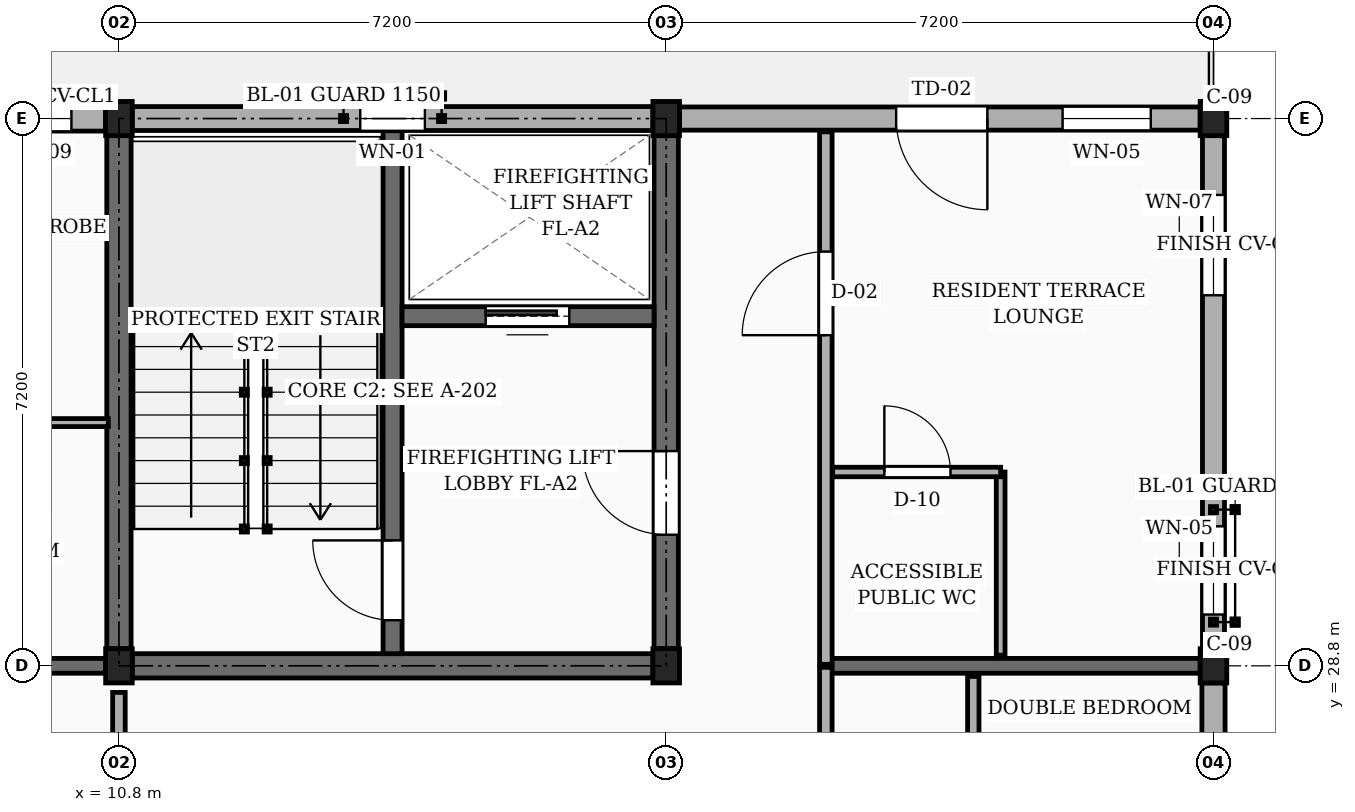
"""IFC4 building model, lengths in metres.
Left out: names, types, materials, properties, quantities, classifications, styles, units other than length and angle.
Written with IfcOpenShell. Run it as: python <this file> out.ifc"""

import sys

from ifc_helpers import new_model, si_unit, direction, frame, frame_2d, origin, origin_2d, place, context, subcontext, project, spatial, rectangle, extrude, element, fill, save


model = new_model("IFC4")
c1 = context("Model", 3, precision=1e-05, world=origin(), true_north=direction((0.0, 1.0)))
c2 = subcontext(c1, "Body", "Model", "MODEL_VIEW")
j1 = project(units=[si_unit("LENGTHUNIT", "METRE"), si_unit("PLANEANGLEUNIT", "RADIAN")], contexts=[c1])
p1 = place(None, origin())
s1 = spatial("IfcSite", under=j1, at=p1, CompositionType="ELEMENT")
p2 = place(p1, origin())
s2 = spatial("IfcBuilding", under=s1, at=p2, CompositionType="ELEMENT")
p3 = place(p2, frame((0.0, 0.0, 45.45)))
s3 = spatial("IfcBuildingStorey", under=s2, at=p3, CompositionType="ELEMENT", Elevation=45.45)
for number, where, z_axis, x_axis in (
    (1, (10.8, 28.8, 0.0), (0.0, 0.0, 1.0), (1.0, 0.0, 0.0)),
    (2, (10.8, 36.0, 0.0), (0.0, 0.0, 1.0), (1.0, 0.0, 0.0)),
    (3, (18.0, 28.8, 0.0), (0.0, 0.0, 1.0), (1.0, 0.0, 0.0)),
    (4, (18.0, 36.0, 0.0), (0.0, 0.0, 1.0), (1.0, 0.0, 0.0)),
    (5, (25.2, 28.8, 0.0), (0.0, 0.0, 1.0), (1.0, 0.0, 0.0)),
    (6, (25.2, 36.0, 0.0), (0.0, 0.0, 1.0), (1.0, 0.0, 0.0)),
):
    element("IfcColumn", number, at=place(p3, frame(where, z_axis=z_axis, x_axis=x_axis)), inside=s3, PredefinedType="COLUMN", context=c2, shape_type="SweptSolid", body=[
        extrude(rectangle(XDim=0.35, YDim=0.45, at=origin_2d()), origin(), (0.0, 0.0, 1.0), 3.15),
    ])
p4 = place(p3, frame((3.775, 28.8, 0.0), z_axis=(0.0, 0.0, 1.0), x_axis=(1.0, 0.0, 0.0)))
e7 = element("IfcWall", 7, at=p4, inside=s3, PredefinedType="SOLIDWALL", context=c2, shape_type="SweptSolid", body=[
    extrude(rectangle(XDim=6.85, YDim=0.195, at=frame_2d((3.425, 0.0))), origin(), (0.0, 0.0, 1.0), 2.17),
])
p5 = place(p4, frame((1.35, 0.0, 0.0)))
e8 = element("IfcOpeningElement", 8, at=p5, cuts=e7, PredefinedType="OPENING", context=c2, shape_type="SweptSolid", body=[
    extrude(rectangle(XDim=0.98, YDim=2.12, at=frame_2d((0.49, 1.06))), frame((0.0, 0.107, 0.0), z_axis=(0.0, -1.0, 0.0), x_axis=(1.0, 0.0, 0.0)), (0.0, 0.0, 1.0), 0.215),
])
p6 = place(p3, frame((20.1, 28.8, 0.0), z_axis=(0.0, 0.0, 1.0), x_axis=(1.0, 0.0, 0.0)))
e9 = element("IfcWall", 9, at=p6, inside=s3, PredefinedType="SOLIDWALL", context=c2, shape_type="SweptSolid", body=[
    extrude(rectangle(XDim=4.925, YDim=0.195, at=frame_2d((2.462, 0.0))), origin(), (0.0, 0.0, 1.0), 2.17),
])
p7 = place(p3, frame((25.2, 21.825, 0.0), z_axis=(0.0, 0.0, 1.0), x_axis=(0.0, 1.0, 0.0)))
e10 = element("IfcWall", 10, at=p7, inside=s3, PredefinedType="SOLIDWALL", context=c2, shape_type="SweptSolid", body=[
    extrude(rectangle(XDim=6.75, YDim=0.305, at=frame_2d((3.375, 0.0))), origin(), (0.0, 0.0, 1.0), 2.44),
])
p8 = place(p7, frame((0.45, 0.0, 0.78)))
e11 = element("IfcOpeningElement", 11, at=p8, cuts=e10, PredefinedType="OPENING", context=c2, shape_type="SweptSolid", body=[
    extrude(rectangle(XDim=1.0, YDim=1.15, at=frame_2d((0.5, 0.575))), frame((0.0, 0.163, 0.0), z_axis=(0.0, -1.0, 0.0), x_axis=(1.0, 0.0, 0.0)), (0.0, 0.0, 1.0), 0.325),
])
p9 = place(p7, frame((4.65, 0.0, 0.78)))
e12 = element("IfcOpeningElement", 12, at=p9, cuts=e10, PredefinedType="OPENING", context=c2, shape_type="SweptSolid", body=[
    extrude(rectangle(XDim=1.16, YDim=1.15, at=frame_2d((0.58, 0.575))), frame((0.0, 0.163, 0.0), z_axis=(0.0, -1.0, 0.0), x_axis=(1.0, 0.0, 0.0)), (0.0, 0.0, 1.0), 0.325),
])
p10 = place(p3, frame((25.2, 29.025, 0.0), z_axis=(0.0, 0.0, 1.0), x_axis=(0.0, 1.0, 0.0)))
e13 = element("IfcWall", 13, at=p10, inside=s3, PredefinedType="SOLIDWALL", context=c2, shape_type="SweptSolid", body=[
    extrude(rectangle(XDim=6.75, YDim=0.29, at=frame_2d((3.375, 0.0))), origin(), (0.0, 0.0, 1.0), 2.44),
])
p11 = place(p10, frame((0.45, 0.0, 0.78)))
e14 = element("IfcOpeningElement", 14, at=p11, cuts=e13, PredefinedType="OPENING", context=c2, shape_type="SweptSolid", body=[
    extrude(rectangle(XDim=1.16, YDim=1.15, at=frame_2d((0.58, 0.575))), frame((0.0, 0.155, 0.0), z_axis=(0.0, -1.0, 0.0), x_axis=(1.0, 0.0, 0.0)), (0.0, 0.0, 1.0), 0.31),
])
p12 = place(p10, frame((4.65, 0.0, 0.78)))
e15 = element("IfcOpeningElement", 15, at=p12, cuts=e13, PredefinedType="OPENING", context=c2, shape_type="SweptSolid", body=[
    extrude(rectangle(XDim=1.32, YDim=1.15, at=frame_2d((0.66, 0.575))), frame((0.0, 0.155, 0.0), z_axis=(0.0, -1.0, 0.0), x_axis=(1.0, 0.0, 0.0)), (0.0, 0.0, 1.0), 0.31),
])
p13 = place(p3, frame((25.025, 36.0, 0.0), z_axis=(0.0, 0.0, 1.0), x_axis=(-1.0, 0.0, 0.0)))
e16 = element("IfcWall", 16, at=p13, inside=s3, PredefinedType="SOLIDWALL", context=c2, shape_type="SweptSolid", body=[
    extrude(rectangle(XDim=6.85, YDim=0.305, at=frame_2d((3.425, 0.0))), origin(), (0.0, 0.0, 1.0), 2.44),
])
p14 = place(p13, frame((2.8, 0.0, 0.0)))
e17 = element("IfcOpeningElement", 17, at=p14, cuts=e16, PredefinedType="OPENING", context=c2, shape_type="SweptSolid", body=[
    extrude(rectangle(XDim=1.2, YDim=2.12, at=frame_2d((0.6, 1.06))), frame((0.0, 0.163, 0.0), z_axis=(0.0, -1.0, 0.0), x_axis=(1.0, 0.0, 0.0)), (0.0, 0.0, 1.0), 0.325),
])
p15 = place(p13, frame((0.65, 0.0, 0.78)))
e18 = element("IfcOpeningElement", 18, at=p15, cuts=e16, PredefinedType="OPENING", context=c2, shape_type="SweptSolid", body=[
    extrude(rectangle(XDim=1.16, YDim=1.15, at=frame_2d((0.58, 0.575))), frame((0.0, 0.163, 0.0), z_axis=(0.0, -1.0, 0.0), x_axis=(1.0, 0.0, 0.0)), (0.0, 0.0, 1.0), 0.325),
])
p16 = place(p3, frame((17.825, 36.0, 0.0), z_axis=(0.0, 0.0, 1.0), x_axis=(-1.0, 0.0, 0.0)))
e19 = element("IfcWall", 19, at=p16, inside=s3, PredefinedType="SOLIDWALL", context=c2, shape_type="SweptSolid", body=[
    extrude(rectangle(XDim=6.85, YDim=0.315, at=frame_2d((3.425, 0.0))), origin(), (0.0, 0.0, 1.0), 2.44),
])
p17 = place(p16, frame((3.0, 0.0, 0.9)))
e20 = element("IfcOpeningElement", 20, at=p17, cuts=e19, PredefinedType="OPENING", context=c2, shape_type="SweptSolid", body=[
    extrude(rectangle(XDim=0.85, YDim=1.15, at=frame_2d((0.425, 0.575))), frame((0.0, 0.167, 0.0), z_axis=(0.0, -1.0, 0.0), x_axis=(1.0, 0.0, 0.0)), (0.0, 0.0, 1.0), 0.335),
])
p18 = place(p3, frame((10.625, 36.0, 0.0), z_axis=(0.0, 0.0, 1.0), x_axis=(-1.0, 0.0, 0.0)))
e21 = element("IfcWall", 21, at=p18, inside=s3, PredefinedType="SOLIDWALL", context=c2, shape_type="SweptSolid", body=[
    extrude(rectangle(XDim=6.85, YDim=0.33, at=frame_2d((3.425, 0.0))), origin(), (0.0, 0.0, 1.0), 2.44),
])
p19 = place(p18, frame((0.45, 0.0, 0.78)))
e22 = element("IfcOpeningElement", 22, at=p19, cuts=e21, PredefinedType="OPENING", context=c2, shape_type="SweptSolid", body=[
    extrude(rectangle(XDim=0.88, YDim=1.26, at=frame_2d((0.44, 0.63))), frame((0.0, 0.175, 0.0), z_axis=(0.0, -1.0, 0.0), x_axis=(1.0, 0.0, 0.0)), (0.0, 0.0, 1.0), 0.35),
])
p20 = place(p18, frame((4.65, 0.0, 0.78)))
e23 = element("IfcOpeningElement", 23, at=p20, cuts=e21, PredefinedType="OPENING", context=c2, shape_type="SweptSolid", body=[
    extrude(rectangle(XDim=1.04, YDim=1.26, at=frame_2d((0.52, 0.63))), frame((0.0, 0.175, 0.0), z_axis=(0.0, -1.0, 0.0), x_axis=(1.0, 0.0, 0.0)), (0.0, 0.0, 1.0), 0.35),
])
p21 = place(p3, frame((10.8, 29.025, 0.0), z_axis=(0.0, 0.0, 1.0), x_axis=(0.0, 1.0, 0.0)))
e24 = element("IfcWall", 24, at=p21, inside=s3, PredefinedType="SHEAR", context=c2, shape_type="SweptSolid", body=[
    extrude(rectangle(XDim=6.75, YDim=0.32, at=frame_2d((3.375, 0.0))), origin(), (0.0, 0.0, 1.0), 2.87),
])
p22 = place(p3, frame((18.0, 29.025, 0.0), z_axis=(0.0, 0.0, 1.0), x_axis=(0.0, 1.0, 0.0)))
e25 = element("IfcWall", 25, at=p22, inside=s3, PredefinedType="SHEAR", context=c2, shape_type="SweptSolid", body=[
    extrude(rectangle(XDim=6.75, YDim=0.32, at=frame_2d((3.375, 0.0))), origin(), (0.0, 0.0, 1.0), 2.87),
])
p23 = place(p22, frame((1.5, 0.0, 0.0)))
e26 = element("IfcOpeningElement", 26, at=p23, cuts=e25, PredefinedType="OPENING", context=c2, shape_type="SweptSolid", body=[
    extrude(rectangle(XDim=1.1, YDim=2.15, at=frame_2d((0.55, 1.075))), frame((0.0, 0.17, 0.0), z_axis=(0.0, -1.0, 0.0), x_axis=(1.0, 0.0, 0.0)), (0.0, 0.0, 1.0), 0.34),
])
p24 = place(p3, frame((10.975, 28.8, 0.0), z_axis=(0.0, 0.0, 1.0), x_axis=(1.0, 0.0, 0.0)))
e27 = element("IfcWall", 27, at=p24, inside=s3, PredefinedType="SHEAR", context=c2, shape_type="SweptSolid", body=[
    extrude(rectangle(XDim=6.85, YDim=0.32, at=frame_2d((3.425, 0.0))), origin(), (0.0, 0.0, 1.0), 2.87),
])
p25 = place(p3, frame((14.4, 28.96, 0.0), z_axis=(0.0, 0.0, 1.0), x_axis=(0.0, 1.0, 0.0)))
e28 = element("IfcWall", 28, at=p25, inside=s3, PredefinedType="SHEAR", context=c2, shape_type="SweptSolid", body=[
    extrude(rectangle(XDim=6.88, YDim=0.25, at=frame_2d((3.44, 0.0))), origin(), (0.0, 0.0, 1.0), 2.87),
])
p26 = place(p25, frame((0.44, 0.0, 0.0)))
e29 = element("IfcOpeningElement", 29, at=p26, cuts=e28, PredefinedType="OPENING", context=c2, shape_type="SweptSolid", body=[
    extrude(rectangle(XDim=1.05, YDim=2.15, at=frame_2d((0.525, 1.075))), frame((0.0, 0.135, 0.0), z_axis=(0.0, -1.0, 0.0), x_axis=(1.0, 0.0, 0.0)), (0.0, 0.0, 1.0), 0.27),
])
p27 = place(p3, frame((14.525, 33.4, 0.0), z_axis=(0.0, 0.0, 1.0), x_axis=(1.0, 0.0, 0.0)))
e30 = element("IfcWall", 30, at=p27, inside=s3, PredefinedType="SHEAR", context=c2, shape_type="SweptSolid", body=[
    extrude(rectangle(XDim=3.315, YDim=0.25, at=frame_2d((1.658, 0.0))), origin(), (0.0, 0.0, 1.0), 2.87),
])
p28 = place(p27, frame((1.1, 0.0, 0.0)))
e31 = element("IfcOpeningElement", 31, at=p28, cuts=e30, PredefinedType="OPENING", context=c2, shape_type="SweptSolid", body=[
    extrude(rectangle(XDim=1.1, YDim=2.2, at=frame_2d((0.55, 1.1))), frame((0.0, 0.135, 0.0), z_axis=(0.0, -1.0, 0.0), x_axis=(1.0, 0.0, 0.0)), (0.0, 0.0, 1.0), 0.27),
])
p29 = place(p3, frame((20.1, 21.62, 0.0), z_axis=(0.0, 0.0, 1.0), x_axis=(0.0, 1.0, 0.0)))
e32 = element("IfcWall", 32, at=p29, inside=s3, PredefinedType="PARTITIONING", context=c2, shape_type="SweptSolid", body=[
    extrude(rectangle(XDim=7.16, YDim=0.165, at=frame_2d((3.58, 0.0))), origin(), (0.0, 0.0, 1.0), 2.305),
])
p30 = place(p29, frame((1.33, 0.0, 0.0)))
e33 = element("IfcOpeningElement", 33, at=p30, cuts=e32, PredefinedType="OPENING", context=c2, shape_type="SweptSolid", body=[
    extrude(rectangle(XDim=1.0, YDim=2.15, at=frame_2d((0.5, 1.075))), frame((0.0, 0.093, 0.0), z_axis=(0.0, -1.0, 0.0), x_axis=(1.0, 0.0, 0.0)), (0.0, 0.0, 1.0), 0.185),
])
p31 = place(p3, frame((20.1, 28.82, 0.0), z_axis=(0.0, 0.0, 1.0), x_axis=(0.0, 1.0, 0.0)))
e34 = element("IfcWall", 34, at=p31, inside=s3, PredefinedType="PARTITIONING", context=c2, shape_type="SweptSolid", body=[
    extrude(rectangle(XDim=7.005, YDim=0.165, at=frame_2d((3.502, 0.0))), origin(), (0.0, 0.0, 1.0), 2.305),
])
p32 = place(p31, frame((4.33, 0.0, 0.0)))
e35 = element("IfcOpeningElement", 35, at=p32, cuts=e34, PredefinedType="OPENING", context=c2, shape_type="SweptSolid", body=[
    extrude(rectangle(XDim=1.1, YDim=2.15, at=frame_2d((0.55, 1.075))), frame((0.0, 0.093, 0.0), z_axis=(0.0, -1.0, 0.0), x_axis=(1.0, 0.0, 0.0)), (0.0, 0.0, 1.0), 0.185),
])
p33 = place(p3, frame((10.8, 21.95, 0.0), z_axis=(0.0, 0.0, 1.0), x_axis=(0.0, 1.0, 0.0)))
e36 = element("IfcWall", 36, at=p33, inside=s3, PredefinedType="PARTITIONING", context=c2, shape_type="SweptSolid", body=[
    extrude(rectangle(XDim=6.5, YDim=0.165, at=frame_2d((3.25, 0.0))), origin(), (0.0, 0.0, 1.0), 2.305),
])
p34 = place(p33, frame((1.0, 0.0, 0.0)))
e37 = element("IfcOpeningElement", 37, at=p34, cuts=e36, PredefinedType="OPENING", context=c2, shape_type="SweptSolid", body=[
    extrude(rectangle(XDim=1.0, YDim=2.15, at=frame_2d((0.5, 1.075))), frame((0.0, 0.093, 0.0), z_axis=(0.0, -1.0, 0.0), x_axis=(1.0, 0.0, 0.0)), (0.0, 0.0, 1.0), 0.185),
])
p35 = place(p3, frame((22.04, 21.74, 0.0), z_axis=(0.0, 0.0, 1.0), x_axis=(0.0, 1.0, 0.0)))
e38 = element("IfcWall", 38, at=p35, inside=s3, PredefinedType="PARTITIONING", context=c2, shape_type="SweptSolid", body=[
    extrude(rectangle(XDim=6.92, YDim=0.15, at=frame_2d((3.46, 0.0))), origin(), (0.0, 0.0, 1.0), 2.305),
])
p36 = place(p35, frame((1.31, 0.0, 0.0)))
e39 = element("IfcOpeningElement", 39, at=p36, cuts=e38, PredefinedType="OPENING", context=c2, shape_type="SweptSolid", body=[
    extrude(rectangle(XDim=0.92, YDim=2.1, at=frame_2d((0.46, 1.05))), frame((0.0, 0.085, 0.0), z_axis=(0.0, -1.0, 0.0), x_axis=(1.0, 0.0, 0.0)), (0.0, 0.0, 1.0), 0.17),
])
p37 = place(p3, frame((7.27, 32.0, 0.0), z_axis=(0.0, 0.0, 1.0), x_axis=(1.0, 0.0, 0.0)))
e40 = element("IfcWall", 40, at=p37, inside=s3, PredefinedType="PARTITIONING", context=c2, shape_type="SweptSolid", body=[
    extrude(rectangle(XDim=3.39, YDim=0.105, at=frame_2d((1.695, 0.0))), origin(), (0.0, 0.0, 1.0), 2.305),
])
p38 = place(p3, frame((22.4, 28.94, 0.0), z_axis=(0.0, 0.0, 1.0), x_axis=(0.0, 1.0, 0.0)))
e41 = element("IfcWall", 41, at=p38, inside=s3, PredefinedType="PARTITIONING", context=c2, shape_type="SweptSolid", body=[
    extrude(rectangle(XDim=2.41, YDim=0.115, at=frame_2d((1.205, 0.0))), origin(), (0.0, 0.0, 1.0), 2.305),
])
p39 = place(p3, frame((20.19, 31.35, 0.0), z_axis=(0.0, 0.0, 1.0), x_axis=(1.0, 0.0, 0.0)))
e42 = element("IfcWall", 42, at=p39, inside=s3, PredefinedType="PARTITIONING", context=c2, shape_type="SweptSolid", body=[
    extrude(rectangle(XDim=2.21, YDim=0.125, at=frame_2d((1.105, 0.0))), origin(), (0.0, 0.0, 1.0), 2.305),
])
p40 = place(p39, frame((0.68, 0.0, 0.0)))
e43 = element("IfcOpeningElement", 43, at=p40, cuts=e42, PredefinedType="OPENING", context=c2, shape_type="SweptSolid", body=[
    extrude(rectangle(XDim=0.87, YDim=2.05, at=frame_2d((0.435, 1.025))), frame((0.0, 0.073, 0.0), z_axis=(0.0, -1.0, 0.0), x_axis=(1.0, 0.0, 0.0)), (0.0, 0.0, 1.0), 0.145),
])
p41 = place(p11, origin())
e44 = element("IfcWindow", 44, at=p41, inside=s3, PartitioningType="SINGLE_PANEL", PredefinedType="WINDOW", context=c2, shape_type="SweptSolid", body=[
    extrude(rectangle(XDim=1.16, YDim=1.15, at=frame_2d((0.58, 0.575))), frame((0.0, 0.03, 0.0), z_axis=(0.0, -1.0, 0.0), x_axis=(1.0, 0.0, 0.0)), (0.0, 0.0, 1.0), 0.06),
])
fill(e14, e44)
p42 = place(p12, origin())
e45 = element("IfcWindow", 45, at=p42, inside=s3, PartitioningType="SINGLE_PANEL", PredefinedType="WINDOW", context=c2, shape_type="SweptSolid", body=[
    extrude(rectangle(XDim=1.32, YDim=1.15, at=frame_2d((0.66, 0.575))), frame((0.0, 0.03, 0.0), z_axis=(0.0, -1.0, 0.0), x_axis=(1.0, 0.0, 0.0)), (0.0, 0.0, 1.0), 0.06),
])
fill(e15, e45)
p43 = place(p14, frame((1.2, 0.0, 0.0), z_axis=(0.0, 0.0, 1.0), x_axis=(-1.0, 0.0, 0.0)))
e46 = element("IfcDoor", 46, at=p43, inside=s3, OperationType="SINGLE_SWING_LEFT", PredefinedType="DOOR", context=c2, shape_type="SweptSolid", body=[
    extrude(rectangle(XDim=1.2, YDim=2.12, at=frame_2d((0.6, 1.06))), frame((0.0, 0.025, 0.0), z_axis=(0.0, -1.0, 0.0), x_axis=(1.0, 0.0, 0.0)), (0.0, 0.0, 1.0), 0.05),
])
fill(e17, e46)
p44 = place(p15, origin())
e47 = element("IfcWindow", 47, at=p44, inside=s3, PartitioningType="SINGLE_PANEL", PredefinedType="WINDOW", context=c2, shape_type="SweptSolid", body=[
    extrude(rectangle(XDim=1.16, YDim=1.15, at=frame_2d((0.58, 0.575))), frame((0.0, 0.03, 0.0), z_axis=(0.0, -1.0, 0.0), x_axis=(1.0, 0.0, 0.0)), (0.0, 0.0, 1.0), 0.06),
])
fill(e18, e47)
p45 = place(p17, origin())
e48 = element("IfcWindow", 48, at=p45, inside=s3, PartitioningType="SINGLE_PANEL", PredefinedType="WINDOW", context=c2, shape_type="SweptSolid", body=[
    extrude(rectangle(XDim=0.85, YDim=1.15, at=frame_2d((0.425, 0.575))), frame((0.0, 0.03, 0.0), z_axis=(0.0, -1.0, 0.0), x_axis=(1.0, 0.0, 0.0)), (0.0, 0.0, 1.0), 0.06),
])
fill(e20, e48)
p46 = place(p19, origin())
e49 = element("IfcWindow", 49, at=p46, inside=s3, PartitioningType="SINGLE_PANEL", PredefinedType="WINDOW", context=c2, shape_type="SweptSolid", body=[
    extrude(rectangle(XDim=0.88, YDim=1.26, at=frame_2d((0.44, 0.63))), frame((0.0, 0.03, 0.0), z_axis=(0.0, -1.0, 0.0), x_axis=(1.0, 0.0, 0.0)), (0.0, 0.0, 1.0), 0.06),
])
fill(e22, e49)
p47 = place(p23, frame((1.1, 0.0, 0.0), z_axis=(0.0, 0.0, 1.0), x_axis=(-1.0, 0.0, 0.0)))
e50 = element("IfcDoor", 50, at=p47, inside=s3, OperationType="SINGLE_SWING_RIGHT", PredefinedType="DOOR", context=c2, shape_type="SweptSolid", body=[
    extrude(rectangle(XDim=1.1, YDim=2.15, at=frame_2d((0.55, 1.075))), frame((0.0, 0.025, 0.0), z_axis=(0.0, -1.0, 0.0), x_axis=(1.0, 0.0, 0.0)), (0.0, 0.0, 1.0), 0.05),
])
fill(e26, e50)
p48 = place(p26, origin())
e51 = element("IfcDoor", 51, at=p48, inside=s3, OperationType="SINGLE_SWING_RIGHT", PredefinedType="DOOR", context=c2, shape_type="SweptSolid", body=[
    extrude(rectangle(XDim=1.05, YDim=2.15, at=frame_2d((0.525, 1.075))), frame((0.0, 0.025, 0.0), z_axis=(0.0, -1.0, 0.0), x_axis=(1.0, 0.0, 0.0)), (0.0, 0.0, 1.0), 0.05),
])
fill(e29, e51)
p49 = place(p28, origin())
e52 = element("IfcDoor", 52, at=p49, inside=s3, OperationType="SLIDING_TO_LEFT", PredefinedType="DOOR", context=c2, shape_type="SweptSolid", body=[
    extrude(rectangle(XDim=1.1, YDim=2.2, at=frame_2d((0.55, 1.1))), frame((0.0, 0.025, 0.0), z_axis=(0.0, -1.0, 0.0), x_axis=(1.0, 0.0, 0.0)), (0.0, 0.0, 1.0), 0.05),
])
fill(e31, e52)
p50 = place(p32, origin())
e53 = element("IfcDoor", 53, at=p50, inside=s3, OperationType="SINGLE_SWING_LEFT", PredefinedType="DOOR", context=c2, shape_type="SweptSolid", body=[
    extrude(rectangle(XDim=1.1, YDim=2.15, at=frame_2d((0.55, 1.075))), frame((0.0, 0.025, 0.0), z_axis=(0.0, -1.0, 0.0), x_axis=(1.0, 0.0, 0.0)), (0.0, 0.0, 1.0), 0.05),
])
fill(e35, e53)
p51 = place(p40, origin())
e54 = element("IfcDoor", 54, at=p51, inside=s3, OperationType="SINGLE_SWING_LEFT", PredefinedType="DOOR", context=c2, shape_type="SweptSolid", body=[
    extrude(rectangle(XDim=0.87, YDim=2.05, at=frame_2d((0.435, 1.025))), frame((0.0, 0.025, 0.0), z_axis=(0.0, -1.0, 0.0), x_axis=(1.0, 0.0, 0.0)), (0.0, 0.0, 1.0), 0.05),
])
fill(e43, e54)
save(model, sys.argv[1])
